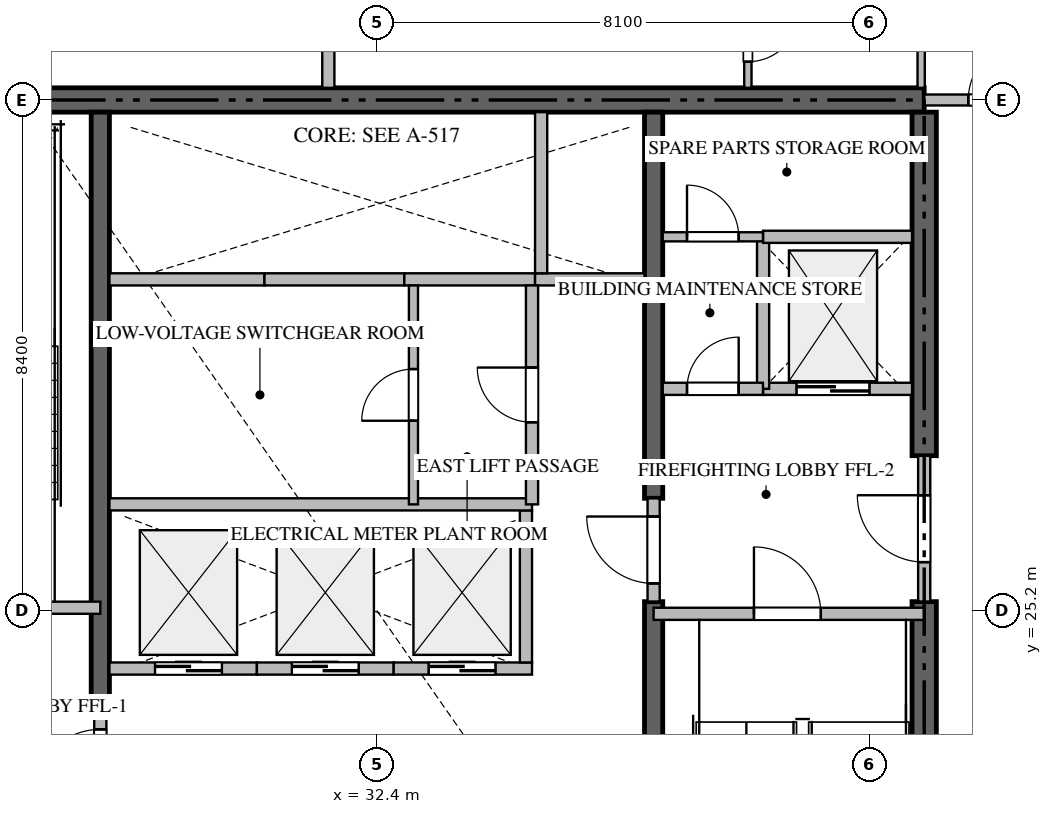
"""IFC4 building model, lengths in metres.
Left out: names, types, materials, properties, quantities, classifications, styles, units other than length and angle.
Written with IfcOpenShell. Run it as: python <this file> out.ifc"""

import sys

from ifc_helpers import new_model, si_unit, direction, frame, frame_2d, origin, place, context, subcontext, project, spatial, rectangle, extrude, source, transform, mapped, element, fill, save


model = new_model("IFC4")
c1 = context("Model", 3, precision=1e-05, world=origin(), true_north=direction((0.0, 1.0)))
c2 = subcontext(c1, "Body", "Model", "MODEL_VIEW")
j1 = project(units=[si_unit("LENGTHUNIT", "METRE"), si_unit("PLANEANGLEUNIT", "RADIAN")], contexts=[c1])
p1 = place(None, origin())
s1 = spatial("IfcSite", under=j1, at=p1, CompositionType="ELEMENT")
p2 = place(p1, origin())
s2 = spatial("IfcBuilding", under=s1, at=p2, CompositionType="ELEMENT")
p3 = place(p2, frame((0.0, 0.0, 161.4)))
s3 = spatial("IfcBuildingStorey", under=s2, at=p3, CompositionType="ELEMENT", Elevation=161.4)
p4 = place(p3, frame((41.4, 33.6, -0.26), z_axis=(0.0, 0.0, 1.0), x_axis=(-1.0, 0.0, 0.0)))
e1 = element("IfcWall", 1, at=p4, inside=s3, PredefinedType="SHEAR", context=c2, shape_type="SweptSolid", body=[
    extrude(rectangle(XDim=18.0, YDim=0.4, at=frame_2d((9.0, 0.0))), origin(), (0.0, 0.0, 1.0), 3.748),
])
p5 = place(p3, frame((41.4, 17.0, -0.26), z_axis=(0.0, 0.0, 1.0), x_axis=(0.0, 1.0, 0.0)))
e2 = element("IfcWall", 2, at=p5, inside=s3, PredefinedType="SHEAR", context=c2, shape_type="SweptSolid", body=[
    extrude(rectangle(XDim=8.35, YDim=0.4, at=frame_2d((4.175, 0.0))), origin(), (0.0, 0.0, 1.0), 3.748),
])
p6 = place(p3, frame((41.4, 27.75, -0.26), z_axis=(0.0, 0.0, 1.0), x_axis=(0.0, 1.0, 0.0)))
e3 = element("IfcWall", 3, at=p6, inside=s3, PredefinedType="SHEAR", context=c2, shape_type="SweptSolid", body=[
    extrude(rectangle(XDim=5.65, YDim=0.4, at=frame_2d((2.825, 0.0))), origin(), (0.0, 0.0, 1.0), 3.748),
])
p7 = place(p3, frame((27.85, 23.55, -0.26), z_axis=(0.0, 0.0, 1.0), x_axis=(0.0, 1.0, 0.0)))
e4 = element("IfcWall", 4, at=p7, inside=s3, PredefinedType="SHEAR", context=c2, shape_type="SweptSolid", body=[
    extrude(rectangle(XDim=9.85, YDim=0.3, at=frame_2d((4.925, 0.0))), origin(), (0.0, 0.0, 1.0), 3.748),
])
p8 = place(p3, frame((36.95, 17.0, -0.26), z_axis=(0.0, 0.0, 1.0), x_axis=(0.0, 1.0, 0.0)))
e5 = element("IfcWall", 5, at=p8, inside=s3, PredefinedType="SHEAR", context=c2, shape_type="SweptSolid", body=[
    extrude(rectangle(XDim=8.35, YDim=0.3, at=frame_2d((4.175, 0.0))), origin(), (0.0, 0.0, 1.0), 3.748),
])
p9 = place(p3, frame((36.95, 27.05, -0.26), z_axis=(0.0, 0.0, 1.0), x_axis=(0.0, 1.0, 0.0)))
e6 = element("IfcWall", 6, at=p9, inside=s3, PredefinedType="SHEAR", context=c2, shape_type="SweptSolid", body=[
    extrude(rectangle(XDim=6.35, YDim=0.3, at=frame_2d((3.175, 0.0))), origin(), (0.0, 0.0, 1.0), 3.748),
])
p10 = place(p3, frame((23.4, 25.25, 0.0), z_axis=(0.0, 0.0, 1.0), x_axis=(1.0, 0.0, 0.0)))
e7 = element("IfcWall", 7, at=p10, inside=s3, PredefinedType="STANDARD", context=c2, shape_type="SweptSolid", body=[
    extrude(rectangle(XDim=4.45, YDim=0.2, at=frame_2d((2.225, 0.0))), origin(), (0.0, 0.0, 1.0), 3.49),
])
p11 = place(p10, frame((1.65, 0.0, 0.0)))
e8 = element("IfcOpeningElement", 8, at=p11, cuts=e7, PredefinedType="OPENING", context=c2, shape_type="SweptSolid", body=[
    extrude(rectangle(XDim=1.1, YDim=2.15, at=frame_2d((0.55, 1.075))), frame((0.0, 0.11, 0.0), z_axis=(0.0, -1.0, 0.0), x_axis=(1.0, 0.0, 0.0)), (0.0, 0.0, 1.0), 0.22),
])
p12 = place(p3, frame((36.95, 25.15, 0.0), z_axis=(0.0, 0.0, 1.0), x_axis=(1.0, 0.0, 0.0)))
e9 = element("IfcWall", 9, at=p12, inside=s3, PredefinedType="STANDARD", context=c2, shape_type="SweptSolid", body=[
    extrude(rectangle(XDim=4.45, YDim=0.2, at=frame_2d((2.225, 0.0))), origin(), (0.0, 0.0, 1.0), 3.49),
])
p13 = place(p12, frame((1.65, 0.0, 0.0)))
e10 = element("IfcOpeningElement", 10, at=p13, cuts=e9, PredefinedType="OPENING", context=c2, shape_type="SweptSolid", body=[
    extrude(rectangle(XDim=1.1, YDim=2.15, at=frame_2d((0.55, 1.075))), frame((0.0, 0.11, 0.0), z_axis=(0.0, -1.0, 0.0), x_axis=(1.0, 0.0, 0.0)), (0.0, 0.0, 1.0), 0.22),
])
p14 = place(p3, frame((38.75, 28.85, 0.0), z_axis=(0.0, 0.0, 1.0), x_axis=(1.0, 0.0, 0.0)))
e11 = element("IfcWall", 11, at=p14, inside=s3, PredefinedType="STANDARD", context=c2, shape_type="SweptSolid", body=[
    extrude(rectangle(XDim=2.45, YDim=0.2, at=frame_2d((1.225, 0.0))), origin(), (0.0, 0.0, 1.0), 3.49),
])
p15 = place(p14, frame((0.55, 0.0, 0.0)))
e12 = element("IfcOpeningElement", 12, at=p15, cuts=e11, PredefinedType="OPENING", context=c2, shape_type="SweptSolid", body=[
    extrude(rectangle(XDim=1.2, YDim=2.2, at=frame_2d((0.6, 1.1))), frame((0.0, 0.11, 0.0), z_axis=(0.0, -1.0, 0.0), x_axis=(1.0, 0.0, 0.0)), (0.0, 0.0, 1.0), 0.22),
])
p16 = place(p3, frame((28.0, 24.25, 0.0), z_axis=(0.0, 0.0, 1.0), x_axis=(1.0, 0.0, 0.0)))
e13 = element("IfcWall", 13, at=p16, inside=s3, PredefinedType="STANDARD", context=c2, shape_type="SweptSolid", body=[
    extrude(rectangle(XDim=2.425, YDim=0.2, at=frame_2d((1.212, 0.0))), origin(), (0.0, 0.0, 1.0), 3.49),
])
p17 = place(p16, frame((0.75, 0.0, 0.0)))
e14 = element("IfcOpeningElement", 14, at=p17, cuts=e13, PredefinedType="OPENING", context=c2, shape_type="SweptSolid", body=[
    extrude(rectangle(XDim=1.1, YDim=2.2, at=frame_2d((0.55, 1.1))), frame((0.0, 0.11, 0.0), z_axis=(0.0, -1.0, 0.0), x_axis=(1.0, 0.0, 0.0)), (0.0, 0.0, 1.0), 0.22),
])
p18 = place(p3, frame((30.425, 24.25, 0.0), z_axis=(0.0, 0.0, 1.0), x_axis=(1.0, 0.0, 0.0)))
e15 = element("IfcWall", 15, at=p18, inside=s3, PredefinedType="STANDARD", context=c2, shape_type="SweptSolid", body=[
    extrude(rectangle(XDim=2.25, YDim=0.2, at=frame_2d((1.125, 0.0))), origin(), (0.0, 0.0, 1.0), 3.49),
])
p19 = place(p18, frame((0.575, 0.0, 0.0)))
e16 = element("IfcOpeningElement", 16, at=p19, cuts=e15, PredefinedType="OPENING", context=c2, shape_type="SweptSolid", body=[
    extrude(rectangle(XDim=1.1, YDim=2.2, at=frame_2d((0.55, 1.1))), frame((0.0, 0.11, 0.0), z_axis=(0.0, -1.0, 0.0), x_axis=(1.0, 0.0, 0.0)), (0.0, 0.0, 1.0), 0.22),
])
p20 = place(p3, frame((32.675, 24.25, 0.0), z_axis=(0.0, 0.0, 1.0), x_axis=(1.0, 0.0, 0.0)))
e17 = element("IfcWall", 17, at=p20, inside=s3, PredefinedType="STANDARD", context=c2, shape_type="SweptSolid", body=[
    extrude(rectangle(XDim=2.275, YDim=0.2, at=frame_2d((1.137, 0.0))), origin(), (0.0, 0.0, 1.0), 3.49),
])
p21 = place(p20, frame((0.575, 0.0, 0.0)))
e18 = element("IfcOpeningElement", 18, at=p21, cuts=e17, PredefinedType="OPENING", context=c2, shape_type="SweptSolid", body=[
    extrude(rectangle(XDim=1.1, YDim=2.2, at=frame_2d((0.55, 1.1))), frame((0.0, 0.11, 0.0), z_axis=(0.0, -1.0, 0.0), x_axis=(1.0, 0.0, 0.0)), (0.0, 0.0, 1.0), 0.22),
])
p22 = place(p3, frame((34.85, 24.35, 0.0), z_axis=(0.0, 0.0, 1.0), x_axis=(0.0, 1.0, 0.0)))
e19 = element("IfcWall", 19, at=p22, inside=s3, PredefinedType="STANDARD", context=c2, shape_type="SweptSolid", body=[
    extrude(rectangle(XDim=2.5, YDim=0.2, at=frame_2d((1.25, 0.0))), origin(), (0.0, 0.0, 1.0), 3.49),
])
p23 = place(p3, frame((28.0, 30.65, 0.0), z_axis=(0.0, 0.0, 1.0), x_axis=(1.0, 0.0, 0.0)))
e20 = element("IfcWall", 20, at=p23, inside=s3, PredefinedType="STANDARD", context=c2, shape_type="SweptSolid", body=[
    extrude(rectangle(XDim=2.55, YDim=0.2, at=frame_2d((1.275, 0.0))), origin(), (0.0, 0.0, 1.0), 3.49),
])
p24 = place(p3, frame((30.55, 30.65, 0.0), z_axis=(0.0, 0.0, 1.0), x_axis=(1.0, 0.0, 0.0)))
e21 = element("IfcWall", 21, at=p24, inside=s3, PredefinedType="STANDARD", context=c2, shape_type="SweptSolid", body=[
    extrude(rectangle(XDim=2.3, YDim=0.2, at=frame_2d((1.15, 0.0))), origin(), (0.0, 0.0, 1.0), 3.49),
])
p25 = place(p3, frame((32.85, 30.65, 0.0), z_axis=(0.0, 0.0, 1.0), x_axis=(1.0, 0.0, 0.0)))
e22 = element("IfcWall", 22, at=p25, inside=s3, PredefinedType="STANDARD", context=c2, shape_type="SweptSolid", body=[
    extrude(rectangle(XDim=2.15, YDim=0.2, at=frame_2d((1.075, 0.0))), origin(), (0.0, 0.0, 1.0), 3.49),
])
p26 = place(p3, frame((35.0, 30.65, 0.0), z_axis=(0.0, 0.0, 1.0), x_axis=(1.0, 0.0, 0.0)))
e23 = element("IfcWall", 23, at=p26, inside=s3, PredefinedType="STANDARD", context=c2, shape_type="SweptSolid", body=[
    extrude(rectangle(XDim=1.8, YDim=0.2, at=frame_2d((0.9, 0.0))), origin(), (0.0, 0.0, 1.0), 3.49),
])
p27 = place(p3, frame((35.1, 30.75, 0.0), z_axis=(0.0, 0.0, 1.0), x_axis=(0.0, 1.0, 0.0)))
e24 = element("IfcWall", 24, at=p27, inside=s3, PredefinedType="STANDARD", context=c2, shape_type="SweptSolid", body=[
    extrude(rectangle(XDim=2.65, YDim=0.2, at=frame_2d((1.325, 0.0))), origin(), (0.0, 0.0, 1.0), 3.49),
])
p28 = place(p3, frame((38.75, 28.85, 0.0), z_axis=(0.0, 0.0, 1.0), x_axis=(0.0, 1.0, 0.0)))
e25 = element("IfcWall", 25, at=p28, inside=s3, PredefinedType="STANDARD", context=c2, shape_type="SweptSolid", body=[
    extrude(rectangle(XDim=2.5, YDim=0.2, at=frame_2d((1.25, 0.0))), origin(), (0.0, 0.0, 1.0), 3.49),
])
p29 = place(p3, frame((38.75, 31.35, 0.0), z_axis=(0.0, 0.0, 1.0), x_axis=(1.0, 0.0, 0.0)))
e26 = element("IfcWall", 26, at=p29, inside=s3, PredefinedType="STANDARD", context=c2, shape_type="SweptSolid", body=[
    extrude(rectangle(XDim=2.45, YDim=0.2, at=frame_2d((1.225, 0.0))), origin(), (0.0, 0.0, 1.0), 3.49),
])
p30 = place(p3, frame((37.1, 28.85, 0.0), z_axis=(0.0, 0.0, 1.0), x_axis=(1.0, 0.0, 0.0)))
e27 = element("IfcWall", 27, at=p30, inside=s3, PredefinedType="STANDARD", context=c2, shape_type="SweptSolid", body=[
    extrude(rectangle(XDim=1.648, YDim=0.2, at=frame_2d((0.824, 0.0))), origin(), (0.0, 0.0, 1.0), 3.49),
])
p31 = place(p30, frame((0.399, 0.0, 0.0)))
e28 = element("IfcOpeningElement", 28, at=p31, cuts=e27, PredefinedType="OPENING", context=c2, shape_type="SweptSolid", body=[
    extrude(rectangle(XDim=0.85, YDim=2.1, at=frame_2d((0.425, 1.05))), frame((0.0, 0.11, 0.0), z_axis=(0.0, -1.0, 0.0), x_axis=(1.0, 0.0, 0.0)), (0.0, 0.0, 1.0), 0.22),
])
p32 = place(p3, frame((41.4, 25.352, 0.0), z_axis=(0.0, 0.0, 1.0), x_axis=(0.0, 1.0, 0.0)))
e29 = element("IfcWall", 29, at=p32, inside=s3, PredefinedType="STANDARD", context=c2, shape_type="SweptSolid", body=[
    extrude(rectangle(XDim=2.396, YDim=0.2, at=frame_2d((1.198, 0.0))), origin(), (0.0, 0.0, 1.0), 3.49),
])
p33 = place(p32, frame((0.648, 0.0, 0.0)))
e30 = element("IfcOpeningElement", 30, at=p33, cuts=e29, PredefinedType="OPENING", context=c2, shape_type="SweptSolid", body=[
    extrude(rectangle(XDim=1.1, YDim=2.15, at=frame_2d((0.55, 1.075))), frame((0.0, 0.11, 0.0), z_axis=(0.0, -1.0, 0.0), x_axis=(1.0, 0.0, 0.0)), (0.0, 0.0, 1.0), 0.22),
])
p34 = place(p3, frame((27.85, 21.852, 0.0), z_axis=(0.0, 0.0, 1.0), x_axis=(0.0, 1.0, 0.0)))
e31 = element("IfcWall", 31, at=p34, inside=s3, PredefinedType="STANDARD", context=c2, shape_type="SweptSolid", body=[
    extrude(rectangle(XDim=1.696, YDim=0.2, at=frame_2d((0.848, 0.0))), origin(), (0.0, 0.0, 1.0), 3.49),
])
p35 = place(p34, frame((0.298, 0.0, 0.0)))
e32 = element("IfcOpeningElement", 32, at=p35, cuts=e31, PredefinedType="OPENING", context=c2, shape_type="SweptSolid", body=[
    extrude(rectangle(XDim=1.1, YDim=2.15, at=frame_2d((0.55, 1.075))), frame((0.0, 0.11, 0.0), z_axis=(0.0, -1.0, 0.0), x_axis=(1.0, 0.0, 0.0)), (0.0, 0.0, 1.0), 0.22),
])
p36 = place(p3, frame((36.95, 25.352, 0.0), z_axis=(0.0, 0.0, 1.0), x_axis=(0.0, 1.0, 0.0)))
e33 = element("IfcWall", 33, at=p36, inside=s3, PredefinedType="STANDARD", context=c2, shape_type="SweptSolid", body=[
    extrude(rectangle(XDim=1.696, YDim=0.2, at=frame_2d((0.848, 0.0))), origin(), (0.0, 0.0, 1.0), 3.49),
])
p37 = place(p36, frame((0.298, 0.0, 0.0)))
e34 = element("IfcOpeningElement", 34, at=p37, cuts=e33, PredefinedType="OPENING", context=c2, shape_type="SweptSolid", body=[
    extrude(rectangle(XDim=1.1, YDim=2.15, at=frame_2d((0.55, 1.075))), frame((0.0, 0.11, 0.0), z_axis=(0.0, -1.0, 0.0), x_axis=(1.0, 0.0, 0.0)), (0.0, 0.0, 1.0), 0.22),
])
p38 = place(p3, frame((28.0, 26.95, 0.0), z_axis=(0.0, 0.0, 1.0), x_axis=(1.0, 0.0, 0.0)))
e35 = element("IfcWall", 35, at=p38, inside=s3, PredefinedType="STANDARD", context=c2, shape_type="SweptSolid", body=[
    extrude(rectangle(XDim=6.95, YDim=0.2, at=frame_2d((3.475, 0.0))), origin(), (0.0, 0.0, 1.0), 3.49),
])
p39 = place(p3, frame((37.1, 31.35, 0.0), z_axis=(0.0, 0.0, 1.0), x_axis=(1.0, 0.0, 0.0)))
e36 = element("IfcWall", 36, at=p39, inside=s3, PredefinedType="PARTITIONING", context=c2, shape_type="SweptSolid", body=[
    extrude(rectangle(XDim=1.648, YDim=0.15, at=frame_2d((0.824, 0.0))), origin(), (0.0, 0.0, 1.0), 3.49),
])
p40 = place(p39, frame((0.399, 0.0, 0.0)))
e37 = element("IfcOpeningElement", 37, at=p40, cuts=e36, PredefinedType="OPENING", context=c2, shape_type="SweptSolid", body=[
    extrude(rectangle(XDim=0.85, YDim=2.1, at=frame_2d((0.425, 1.05))), frame((0.0, 0.085, 0.0), z_axis=(0.0, -1.0, 0.0), x_axis=(1.0, 0.0, 0.0)), (0.0, 0.0, 1.0), 0.17),
])
p41 = place(p3, frame((34.95, 26.95, 0.0), z_axis=(0.0, 0.0, 1.0), x_axis=(0.0, 1.0, 0.0)))
e38 = element("IfcWall", 38, at=p41, inside=s3, PredefinedType="STANDARD", context=c2, shape_type="SweptSolid", body=[
    extrude(rectangle(XDim=3.6, YDim=0.2, at=frame_2d((1.8, 0.0))), origin(), (0.0, 0.0, 1.0), 3.49),
])
p42 = place(p41, frame((1.35, 0.0, 0.0)))
e39 = element("IfcOpeningElement", 39, at=p42, cuts=e38, PredefinedType="OPENING", context=c2, shape_type="SweptSolid", body=[
    extrude(rectangle(XDim=0.9, YDim=2.1, at=frame_2d((0.45, 1.05))), frame((0.0, 0.11, 0.0), z_axis=(0.0, -1.0, 0.0), x_axis=(1.0, 0.0, 0.0)), (0.0, 0.0, 1.0), 0.22),
])
p43 = place(p3, frame((33.0, 26.95, 0.0), z_axis=(0.0, 0.0, 1.0), x_axis=(0.0, 1.0, 0.0)))
e40 = element("IfcWall", 40, at=p43, inside=s3, PredefinedType="PARTITIONING", context=c2, shape_type="SweptSolid", body=[
    extrude(rectangle(XDim=3.6, YDim=0.15, at=frame_2d((1.8, 0.0))), origin(), (0.0, 0.0, 1.0), 3.49),
])
p44 = place(p43, frame((1.375, 0.0, 0.0)))
e41 = element("IfcOpeningElement", 41, at=p44, cuts=e40, PredefinedType="OPENING", context=c2, shape_type="SweptSolid", body=[
    extrude(rectangle(XDim=0.85, YDim=2.1, at=frame_2d((0.425, 1.05))), frame((0.0, 0.085, 0.0), z_axis=(0.0, -1.0, 0.0), x_axis=(1.0, 0.0, 0.0)), (0.0, 0.0, 1.0), 0.17),
])
p45 = place(p3, frame((31.6, 33.8, 0.0), z_axis=(0.0, 0.0, 1.0), x_axis=(0.0, 1.0, 0.0)))
e42 = element("IfcWall", 42, at=p45, inside=s3, PredefinedType="PARTITIONING", context=c2, shape_type="SweptSolid", body=[
    extrude(rectangle(XDim=15.118, YDim=0.2, at=frame_2d((7.559, 0.0))), origin(), (0.0, 0.0, 1.0), 3.49),
])
p46 = place(p3, frame((41.402, 33.6, 0.0), z_axis=(0.0, 0.0, 1.0), x_axis=(1.0, 0.0, 0.0)))
e43 = element("IfcWall", 43, at=p46, inside=s3, PredefinedType="PARTITIONING", context=c2, shape_type="SweptSolid", body=[
    extrude(rectangle(XDim=2.446, YDim=0.18, at=frame_2d((1.223, 0.0))), origin(), (0.0, 0.0, 1.0), 3.49),
])
p47 = place(p46, frame((0.723, 0.0, 0.0)))
e44 = element("IfcOpeningElement", 44, at=p47, cuts=e43, PredefinedType="OPENING", context=c2, shape_type="SweptSolid", body=[
    extrude(rectangle(XDim=1.0, YDim=2.15, at=frame_2d((0.5, 1.075))), frame((0.0, 0.1, 0.0), z_axis=(0.0, -1.0, 0.0), x_axis=(1.0, 0.0, 0.0)), (0.0, 0.0, 1.0), 0.2),
])
p48 = place(p3, frame((41.35, 36.35, 0.0), z_axis=(0.0, 0.0, 1.0), x_axis=(0.0, -1.0, 0.0)))
e45 = element("IfcWall", 45, at=p48, inside=s3, PredefinedType="PARTITIONING", context=c2, shape_type="SweptSolid", body=[
    extrude(rectangle(XDim=2.55, YDim=0.12, at=frame_2d((1.275, 0.0))), origin(), (0.0, 0.0, 1.0), 3.49),
])
p49 = place(p3, frame((38.5, 35.648, 0.0), z_axis=(0.0, 0.0, 1.0), x_axis=(0.0, -1.0, 0.0)))
e46 = element("IfcWall", 46, at=p49, inside=s3, PredefinedType="PARTITIONING", context=c2, shape_type="SweptSolid", body=[
    extrude(rectangle(XDim=1.848, YDim=0.12, at=frame_2d((0.924, 0.0))), origin(), (0.0, 0.0, 1.0), 3.49),
])
p50 = place(p49, frame((0.569, 0.0, 0.0)))
e47 = element("IfcOpeningElement", 47, at=p50, cuts=e46, PredefinedType="OPENING", context=c2, shape_type="SweptSolid", body=[
    extrude(rectangle(XDim=0.85, YDim=2.1, at=frame_2d((0.425, 1.05))), frame((0.0, 0.07, 0.0), z_axis=(0.0, -1.0, 0.0), x_axis=(1.0, 0.0, 0.0)), (0.0, 0.0, 1.0), 0.14),
])
m1 = source(origin(), c2, "Body", "SweptSolid", [
    extrude(rectangle(XDim=1.1, YDim=2.15, at=frame_2d((0.55, 1.075))), frame((0.0, 0.025, 0.0), z_axis=(0.0, -1.0, 0.0), x_axis=(1.0, 0.0, 0.0)), (0.0, 0.0, 1.0), 0.05),
])
p51 = place(p13, origin())
e48 = element("IfcDoor", 48, at=p51, inside=s3, OperationType="SINGLE_SWING_LEFT", PredefinedType="DOOR", context=c2, shape_type="MappedRepresentation", body=[
    mapped(m1, transform((0.0, 0.0, 0.0), scale=1.0)),
])
fill(e10, e48)
m2 = source(origin(), c2, "Body", "SweptSolid", [
    extrude(rectangle(XDim=1.2, YDim=2.2, at=frame_2d((0.6, 1.1))), frame((0.0, 0.025, 0.0), z_axis=(0.0, -1.0, 0.0), x_axis=(1.0, 0.0, 0.0)), (0.0, 0.0, 1.0), 0.05),
])
p52 = place(p15, origin())
e49 = element("IfcDoor", 49, at=p52, inside=s3, OperationType="DOUBLE_DOOR_SLIDING", PredefinedType="DOOR", context=c2, shape_type="MappedRepresentation", body=[
    mapped(m2, transform((0.0, 0.0, 0.0), scale=1.0)),
])
fill(e12, e49)
m3 = source(origin(), c2, "Body", "SweptSolid", [
    extrude(rectangle(XDim=1.1, YDim=2.2, at=frame_2d((0.55, 1.1))), frame((0.0, 0.025, 0.0), z_axis=(0.0, -1.0, 0.0), x_axis=(1.0, 0.0, 0.0)), (0.0, 0.0, 1.0), 0.05),
])
p53 = place(p17, origin())
e50 = element("IfcDoor", 50, at=p53, inside=s3, OperationType="DOUBLE_DOOR_SLIDING", PredefinedType="DOOR", context=c2, shape_type="MappedRepresentation", body=[
    mapped(m3, transform((0.0, 0.0, 0.0), scale=1.0)),
])
fill(e14, e50)
p54 = place(p19, origin())
e51 = element("IfcDoor", 51, at=p54, inside=s3, OperationType="DOUBLE_DOOR_SLIDING", PredefinedType="DOOR", context=c2, shape_type="MappedRepresentation", body=[
    mapped(m3, transform((0.0, 0.0, 0.0), scale=1.0)),
])
fill(e16, e51)
p55 = place(p21, origin())
e52 = element("IfcDoor", 52, at=p55, inside=s3, OperationType="DOUBLE_DOOR_SLIDING", PredefinedType="DOOR", context=c2, shape_type="MappedRepresentation", body=[
    mapped(m3, transform((0.0, 0.0, 0.0), scale=1.0)),
])
fill(e18, e52)
m4 = source(origin(), c2, "Body", "SweptSolid", [
    extrude(rectangle(XDim=0.85, YDim=2.1, at=frame_2d((0.425, 1.05))), frame((0.0, 0.025, 0.0), z_axis=(0.0, -1.0, 0.0), x_axis=(1.0, 0.0, 0.0)), (0.0, 0.0, 1.0), 0.05),
])
p56 = place(p31, origin())
e53 = element("IfcDoor", 53, at=p56, inside=s3, OperationType="SINGLE_SWING_RIGHT", PredefinedType="DOOR", context=c2, shape_type="MappedRepresentation", body=[
    mapped(m4, transform((0.0, 0.0, 0.0), scale=1.0)),
])
fill(e28, e53)
p57 = place(p33, origin())
e54 = element("IfcDoor", 54, at=p57, inside=s3, OperationType="SINGLE_SWING_RIGHT", PredefinedType="DOOR", context=c2, shape_type="MappedRepresentation", body=[
    mapped(m1, transform((0.0, 0.0, 0.0), scale=1.0)),
])
fill(e30, e54)
p58 = place(p35, origin())
e55 = element("IfcDoor", 55, at=p58, inside=s3, OperationType="SINGLE_SWING_LEFT", PredefinedType="DOOR", context=c2, shape_type="MappedRepresentation", body=[
    mapped(m1, transform((0.0, 0.0, 0.0), scale=1.0)),
])
fill(e32, e55)
p59 = place(p37, origin())
e56 = element("IfcDoor", 56, at=p59, inside=s3, OperationType="SINGLE_SWING_RIGHT", PredefinedType="DOOR", context=c2, shape_type="MappedRepresentation", body=[
    mapped(m1, transform((0.0, 0.0, 0.0), scale=1.0)),
])
fill(e34, e56)
p60 = place(p40, origin())
e57 = element("IfcDoor", 57, at=p60, inside=s3, OperationType="SINGLE_SWING_LEFT", PredefinedType="DOOR", context=c2, shape_type="MappedRepresentation", body=[
    mapped(m4, transform((0.0, 0.0, 0.0), scale=1.0)),
])
fill(e37, e57)
m5 = source(origin(), c2, "Body", "SweptSolid", [
    extrude(rectangle(XDim=0.9, YDim=2.1, at=frame_2d((0.45, 1.05))), frame((0.0, 0.025, 0.0), z_axis=(0.0, -1.0, 0.0), x_axis=(1.0, 0.0, 0.0)), (0.0, 0.0, 1.0), 0.05),
])
p61 = place(p42, origin())
e58 = element("IfcDoor", 58, at=p61, inside=s3, OperationType="SINGLE_SWING_RIGHT", PredefinedType="DOOR", context=c2, shape_type="MappedRepresentation", body=[
    mapped(m5, transform((0.0, 0.0, 0.0), scale=1.0)),
])
fill(e39, e58)
p62 = place(p44, origin())
e59 = element("IfcDoor", 59, at=p62, inside=s3, OperationType="SINGLE_SWING_LEFT", PredefinedType="DOOR", context=c2, shape_type="MappedRepresentation", body=[
    mapped(m4, transform((0.0, 0.0, 0.0), scale=1.0)),
])
fill(e41, e59)
m6 = source(origin(), c2, "Body", "SweptSolid", [
    extrude(rectangle(XDim=1.0, YDim=2.15, at=frame_2d((0.5, 1.075))), frame((0.0, 0.025, 0.0), z_axis=(0.0, -1.0, 0.0), x_axis=(1.0, 0.0, 0.0)), (0.0, 0.0, 1.0), 0.05),
])
p63 = place(p47, origin())
e60 = element("IfcDoor", 60, at=p63, inside=s3, OperationType="SINGLE_SWING_RIGHT", PredefinedType="DOOR", context=c2, shape_type="MappedRepresentation", body=[
    mapped(m6, transform((0.0, 0.0, 0.0), scale=1.0)),
])
fill(e44, e60)
p64 = place(p50, origin())
e61 = element("IfcDoor", 61, at=p64, inside=s3, OperationType="SINGLE_SWING_LEFT", PredefinedType="DOOR", context=c2, shape_type="MappedRepresentation", body=[
    mapped(m4, transform((0.0, 0.0, 0.0), scale=1.0)),
])
fill(e47, e61)
save(model, sys.argv[1])
